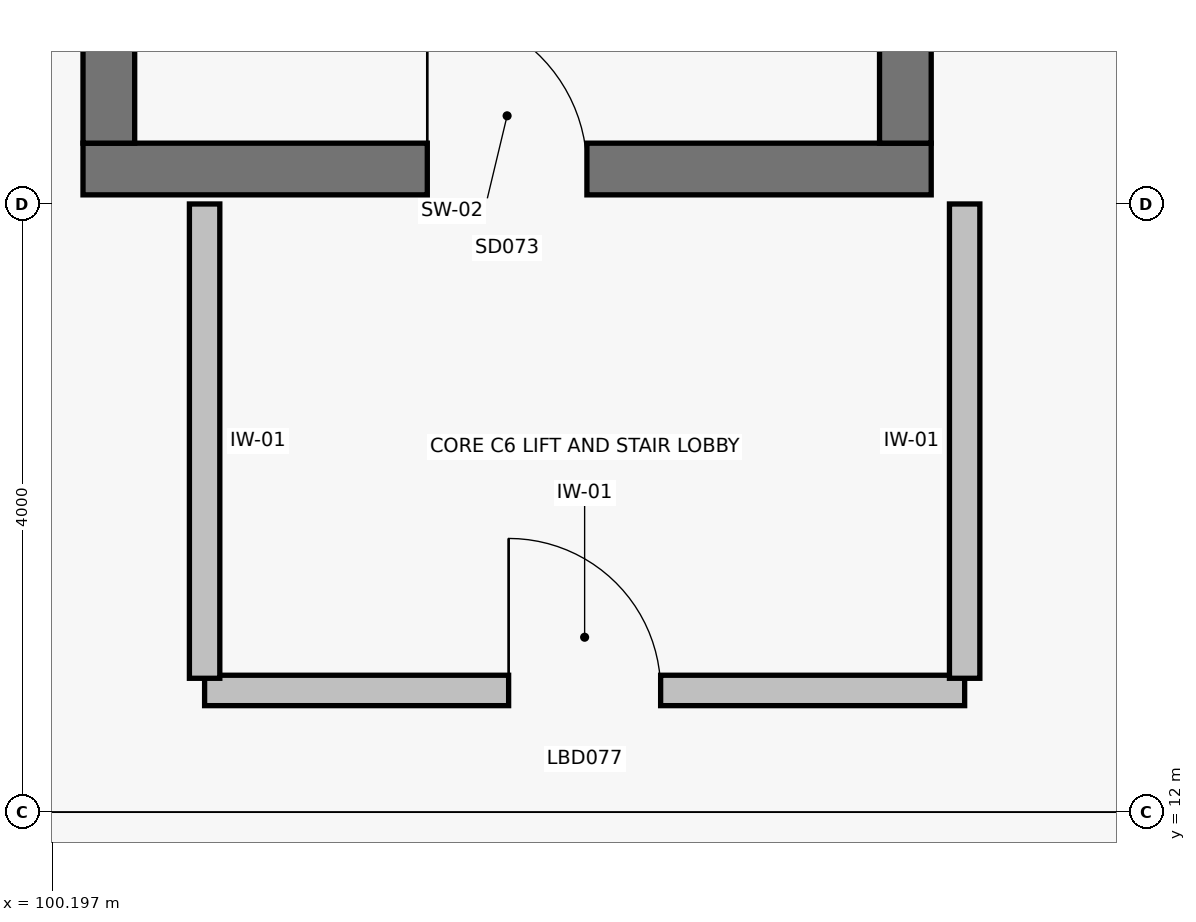
"""IFC4 building model, lengths in metres.
Left out: names, types, materials, properties, quantities, classifications, styles, units other than length and angle.
Written with IfcOpenShell. Run it as: python <this file> out.ifc"""

import sys

from ifc_helpers import new_model, si_unit, direction, frame, frame_2d, origin, place, context, subcontext, project, spatial, rectangle, extrude, element, fill, save


model = new_model("IFC4")
c1 = context("Model", 3, precision=1e-05, world=origin(), true_north=direction((0.0, 1.0)))
c2 = subcontext(c1, "Body", "Model", "MODEL_VIEW")
j1 = project(units=[si_unit("LENGTHUNIT", "METRE"), si_unit("PLANEANGLEUNIT", "RADIAN")], contexts=[c1])
p1 = place(None, origin())
s1 = spatial("IfcSite", under=j1, at=p1, CompositionType="ELEMENT")
p2 = place(p1, origin())
s2 = spatial("IfcBuilding", under=s1, at=p2, CompositionType="ELEMENT")
p3 = place(p2, origin())
s3 = spatial("IfcBuildingStorey", under=s2, at=p3, CompositionType="ELEMENT", Elevation=0.0)
p4 = place(p3, frame((100.4, 16.23, 0.0), z_axis=(0.0, 0.0, 1.0), x_axis=(1.0, 0.0, 0.0)))
e1 = element("IfcWall", 1, at=p4, inside=s3, PredefinedType="SHEAR", context=c2, shape_type="SweptSolid", body=[
    extrude(rectangle(XDim=5.58, YDim=0.34, at=frame_2d((2.79, 0.0))), origin(), (0.0, 0.0, 1.0), 6.32),
])
p5 = place(p4, frame((2.265, 0.0, 0.0)))
e2 = element("IfcOpeningElement", 2, at=p5, cuts=e1, PredefinedType="OPENING", context=c2, shape_type="SweptSolid", body=[
    extrude(rectangle(XDim=1.05, YDim=2.15, at=frame_2d((0.525, 1.075))), frame((0.0, 0.185, 0.0), z_axis=(0.0, -1.0, 0.0), x_axis=(1.0, 0.0, 0.0)), (0.0, 0.0, 1.0), 0.37),
])
for number, where, z_axis, x_axis in (
    (3, (100.57, 26.4, 0.0), (0.0, 0.0, 1.0), (0.0, -1.0, 0.0)),
    (4, (105.81, 16.4, 0.0), (0.0, 0.0, 1.0), (0.0, 1.0, 0.0)),
):
    element("IfcWall", number, at=place(p3, frame(where, z_axis=z_axis, x_axis=x_axis)), inside=s3, PredefinedType="SHEAR", context=c2, shape_type="SweptSolid", body=[
        extrude(rectangle(XDim=10.0, YDim=0.34, at=frame_2d((5.0, 0.0))), origin(), (0.0, 0.0, 1.0), 6.32),
    ])
p6 = place(p3, frame((101.2, 12.8, 0.0), z_axis=(0.0, 0.0, 1.0), x_axis=(1.0, 0.0, 0.0)))
e5 = element("IfcWall", 5, at=p6, inside=s3, PredefinedType="PARTITIONING", context=c2, shape_type="SweptSolid", body=[
    extrude(rectangle(XDim=5.0, YDim=0.2, at=frame_2d((2.5, 0.0))), origin(), (0.0, 0.0, 1.0), 5.942),
])
p7 = place(p6, frame((2.0, 0.0, 0.0)))
e6 = element("IfcOpeningElement", 6, at=p7, cuts=e5, PredefinedType="OPENING", context=c2, shape_type="SweptSolid", body=[
    extrude(rectangle(XDim=1.0, YDim=2.15, at=frame_2d((0.5, 1.075))), frame((0.0, 0.115, 0.0), z_axis=(0.0, -1.0, 0.0), x_axis=(1.0, 0.0, 0.0)), (0.0, 0.0, 1.0), 0.23),
])
for number, where, z_axis, x_axis in (
    (7, (101.2, 16.0, 0.0), (0.0, 0.0, 1.0), (0.0, -1.0, 0.0)),
    (8, (106.2, 12.88, 0.0), (0.0, 0.0, 1.0), (0.0, 1.0, 0.0)),
):
    element("IfcWall", number, at=place(p3, frame(where, z_axis=z_axis, x_axis=x_axis)), inside=s3, PredefinedType="PARTITIONING", context=c2, shape_type="SweptSolid", body=[
        extrude(rectangle(XDim=3.12, YDim=0.2, at=frame_2d((1.56, 0.0))), origin(), (0.0, 0.0, 1.0), 5.689),
    ])
p8 = place(p5, origin())
e9 = element("IfcDoor", 9, at=p8, inside=s3, OperationType="SINGLE_SWING_LEFT", PredefinedType="DOOR", context=c2, shape_type="SweptSolid", body=[
    extrude(rectangle(XDim=1.05, YDim=2.15, at=frame_2d((0.525, 1.075))), frame((0.0, 0.025, 0.0), z_axis=(0.0, -1.0, 0.0), x_axis=(1.0, 0.0, 0.0)), (0.0, 0.0, 1.0), 0.05),
])
fill(e2, e9)
p9 = place(p7, origin())
e10 = element("IfcDoor", 10, at=p9, inside=s3, OperationType="SINGLE_SWING_LEFT", PredefinedType="DOOR", context=c2, shape_type="SweptSolid", body=[
    extrude(rectangle(XDim=1.0, YDim=2.15, at=frame_2d((0.5, 1.075))), frame((0.0, 0.025, 0.0), z_axis=(0.0, -1.0, 0.0), x_axis=(1.0, 0.0, 0.0)), (0.0, 0.0, 1.0), 0.05),
])
fill(e6, e10)
save(model, sys.argv[1])
